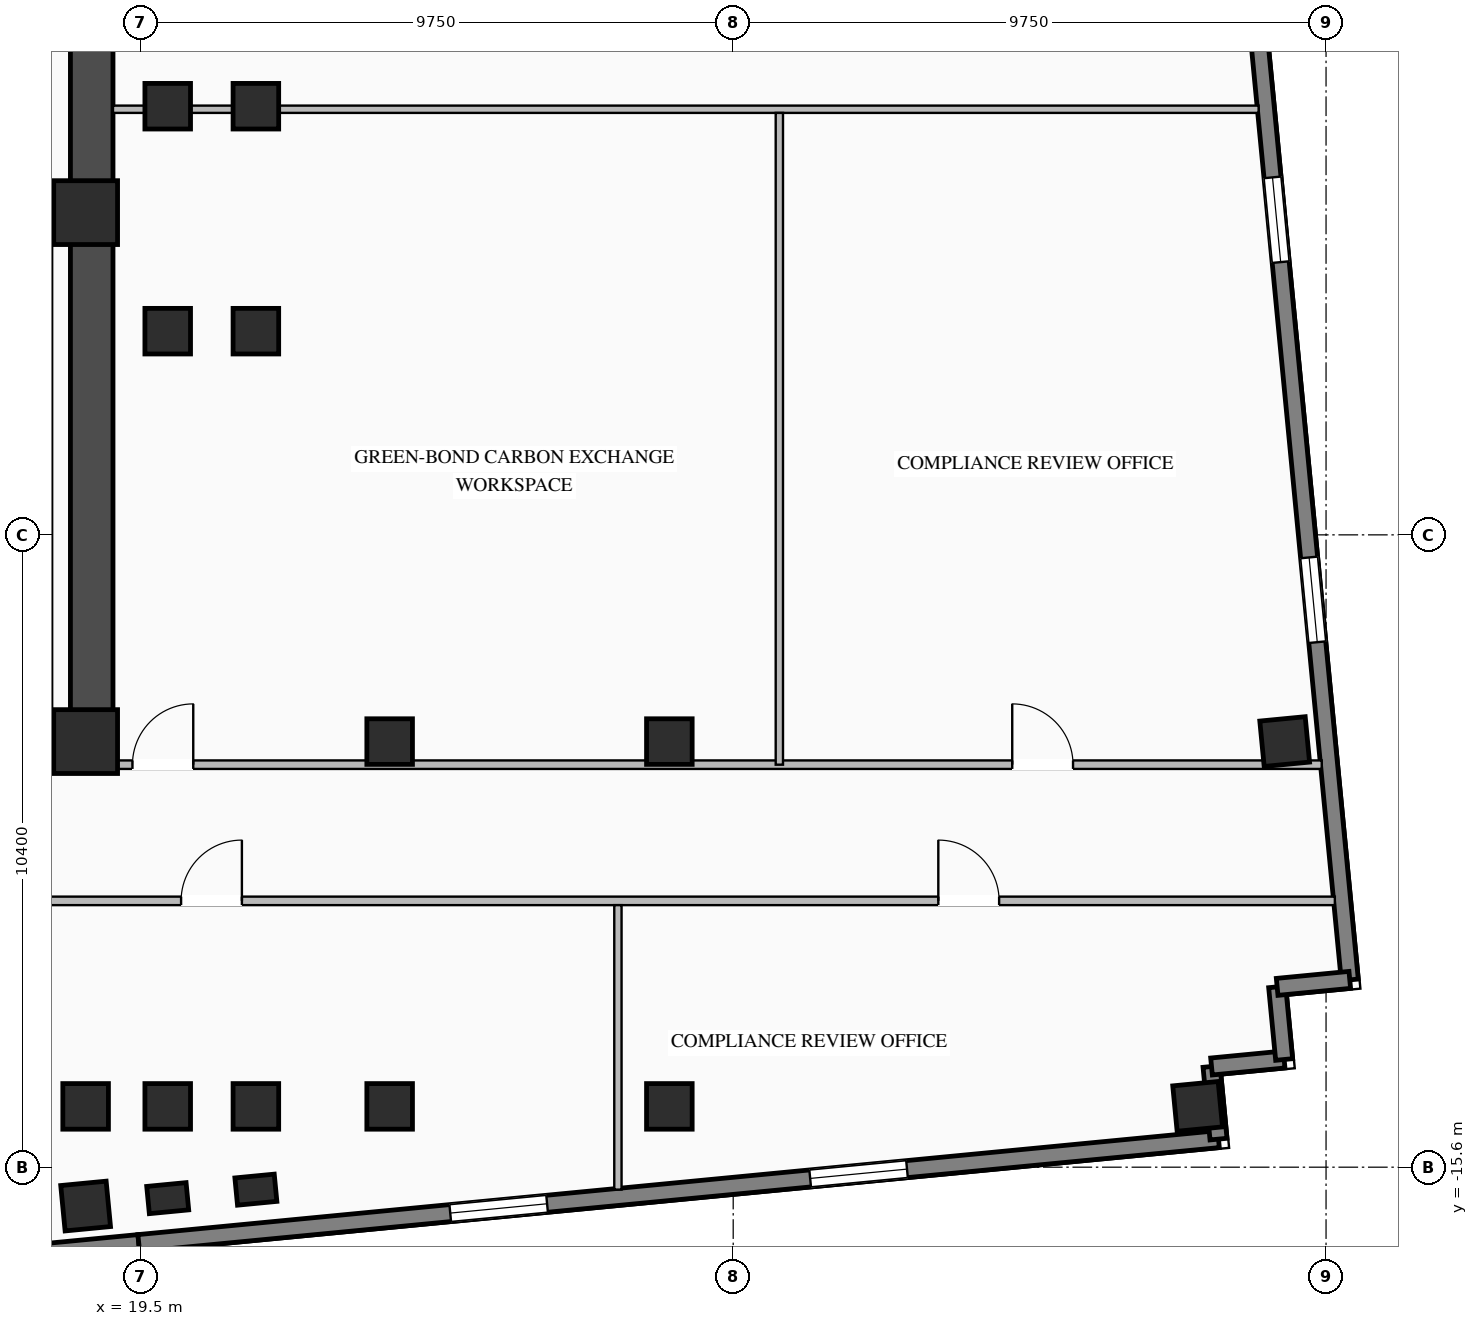
"""IFC4 building model, lengths in metres.
Left out: names, types, materials, properties, quantities, classifications, styles, units other than length and angle.
Written with IfcOpenShell. Run it as: python <this file> out.ifc"""

import sys

from ifc_helpers import new_model, si_unit, direction, frame, frame_2d, origin, origin_2d, place, context, subcontext, project, spatial, rectangle, i_section, extrude, element, fill, save


model = new_model("IFC4")
c1 = context("Model", 3, precision=1e-05, world=origin(), true_north=direction((0.0, 1.0)))
c2 = subcontext(c1, "Body", "Model", "MODEL_VIEW")
j1 = project(units=[si_unit("LENGTHUNIT", "METRE"), si_unit("PLANEANGLEUNIT", "RADIAN")], contexts=[c1])
p1 = place(None, origin())
s1 = spatial("IfcSite", under=j1, at=p1, CompositionType="ELEMENT")
p2 = place(p1, origin())
s2 = spatial("IfcBuilding", under=s1, at=p2, CompositionType="ELEMENT")
p3 = place(p2, frame((0.0, 0.0, 94.9)))
s3 = spatial("IfcBuildingStorey", under=s2, at=p3, CompositionType="ELEMENT", Elevation=94.9)
p4 = place(p3, frame((8.8, -8.7, 0.0), z_axis=(0.0, 0.0, 1.0), x_axis=(1.0, 0.0, 0.0)))
e1 = element("IfcWall", 1, at=p4, inside=s3, PredefinedType="SHEAR", context=c2, shape_type="SweptSolid", body=[
    extrude(rectangle(XDim=10.25, YDim=0.7, at=frame_2d((5.125, 0.0))), origin(), (0.0, 0.0, 1.0), 3.27),
])
p5 = place(p3, frame((18.7, -8.35, 0.0), z_axis=(0.0, 0.0, 1.0), x_axis=(0.0, 1.0, 0.0)))
e2 = element("IfcWall", 2, at=p5, inside=s3, PredefinedType="SHEAR", context=c2, shape_type="SweptSolid", body=[
    extrude(rectangle(XDim=16.7, YDim=0.7, at=frame_2d((8.35, 0.0))), origin(), (0.0, 0.0, 1.0), 3.27),
])
for number, where, z_axis, x_axis in (
    (3, (18.6, -8.6, 0.0), (0.0, 0.0, 1.0), (1.0, 0.0, 0.0)),
    (4, (18.6, 0.1, 0.0), (0.0, 0.0, 1.0), (1.0, 0.0, 0.0)),
):
    element("IfcColumn", number, at=place(p3, frame(where, z_axis=z_axis, x_axis=x_axis)), inside=s3, PredefinedType="COLUMN", context=c2, shape_type="SweptSolid", body=[
        extrude(rectangle(XDim=1.05, YDim=1.05, at=origin_2d()), origin(), (0.0, 0.0, 1.0), 3.45),
    ])
for number, where, z_axis, x_axis in (
    (5, (18.6, -14.6, 0.0), (0.0, 0.0, 1.0), (1.0, 0.0, 0.0)),
    (6, (19.95, -14.6, 0.0), (0.0, 0.0, 1.0), (1.0, 0.0, 0.0)),
    (7, (21.4, -14.6, 0.0), (0.0, 0.0, 1.0), (1.0, 0.0, 0.0)),
    (8, (19.95, -1.85, 0.0), (0.0, 0.0, 1.0), (1.0, 0.0, 0.0)),
    (9, (19.95, 1.85, 0.0), (0.0, 0.0, 1.0), (1.0, 0.0, 0.0)),
    (10, (21.4, -1.85, 0.0), (0.0, 0.0, 1.0), (1.0, 0.0, 0.0)),
    (11, (21.4, 1.85, 0.0), (0.0, 0.0, 1.0), (1.0, 0.0, 0.0)),
    (12, (23.6, -14.6, 0.0), (0.0, 0.0, 1.0), (1.0, 0.0, 0.0)),
    (13, (23.6, -8.6, 0.0), (0.0, 0.0, 1.0), (1.0, 0.0, 0.0)),
    (14, (28.2, -14.6, 0.0), (0.0, 0.0, 1.0), (1.0, 0.0, 0.0)),
    (15, (28.2, -8.6, 0.0), (0.0, 0.0, 1.0), (1.0, 0.0, 0.0)),
    (16, (18.6, -16.239, 0.0), (0.0, 0.0, 1.0), (0.995, 0.096, 0.0)),
    (17, (36.888, -14.6, 0.0), (0.0, 0.0, 1.0), (0.995, 0.096, 0.0)),
    (18, (38.32, -8.6, 0.0), (0.0, 0.0, 1.0), (0.995, 0.096, 0.0)),
):
    element("IfcColumn", number, at=place(p3, frame(where, z_axis=z_axis, x_axis=x_axis)), inside=s3, PredefinedType="COLUMN", context=c2, shape_type="SweptSolid", body=[
        extrude(i_section(OverallWidth=0.75, OverallDepth=0.75, WebThickness=0.03, FlangeThickness=0.044, at=origin_2d()), origin(), (0.0, 0.0, 1.0), 3.45),
    ])
for number, where, z_axis, x_axis in (
    (19, (19.95, -16.109, 0.0), (0.0, 0.0, 1.0), (0.995, 0.096, 0.0)),
    (20, (21.4, -15.969, 0.0), (0.0, 0.0, 1.0), (0.995, 0.096, 0.0)),
):
    element("IfcColumn", number, at=place(p3, frame(where, z_axis=z_axis, x_axis=x_axis)), inside=s3, PredefinedType="PILASTER", context=c2, shape_type="SweptSolid", body=[
        extrude(rectangle(XDim=0.65, YDim=0.45, at=origin_2d()), origin(), (0.0, 0.0, 1.0), 3.45),
    ])
p6 = place(p3, frame((19.474, -16.848, 0.0), z_axis=(0.0, 0.0, 1.0), x_axis=(-0.995396794462, -0.09583956164, 0.0)))
e21 = element("IfcWall", 21, at=p6, inside=s3, PredefinedType="STANDARD", context=c2, shape_type="SweptSolid", body=[
    extrude(rectangle(XDim=9.0, YDim=0.28, at=frame_2d((4.5, 0.0))), origin(), (0.0, 0.0, 1.0), 3.25),
])
p7 = place(p6, frame((2.2, 0.0, 0.76)))
e22 = element("IfcOpeningElement", 22, at=p7, cuts=e21, PredefinedType="OPENING", context=c2, shape_type="SweptSolid", body=[
    extrude(rectangle(XDim=1.6, YDim=1.95, at=frame_2d((0.8, 0.975))), frame((0.0, 0.15, 0.0), z_axis=(0.0, -1.0, 0.0), x_axis=(1.0, 0.0, 0.0)), (0.0, 0.0, 1.0), 0.3),
])
p8 = place(p6, frame((5.75, 0.0, 0.76)))
e23 = element("IfcOpeningElement", 23, at=p8, cuts=e21, PredefinedType="OPENING", context=c2, shape_type="SweptSolid", body=[
    extrude(rectangle(XDim=1.6, YDim=1.95, at=frame_2d((0.8, 0.975))), frame((0.0, 0.15, 0.0), z_axis=(0.0, -1.0, 0.0), x_axis=(1.0, 0.0, 0.0)), (0.0, 0.0, 1.0), 0.3),
])
p9 = place(p3, frame((37.231, -15.138, 0.0), z_axis=(0.0, 0.0, 1.0), x_axis=(-0.995395780835, -0.095850088663, 0.0)))
e24 = element("IfcWall", 24, at=p9, inside=s3, PredefinedType="STANDARD", context=c2, shape_type="SweptSolid", body=[
    extrude(rectangle(XDim=17.84, YDim=0.28, at=frame_2d((8.92, 0.0))), origin(), (0.0, 0.0, 1.0), 3.25),
])
p10 = place(p9, frame((5.147, 0.0, 0.76)))
e25 = element("IfcOpeningElement", 25, at=p10, cuts=e24, PredefinedType="OPENING", context=c2, shape_type="SweptSolid", body=[
    extrude(rectangle(XDim=1.6, YDim=1.95, at=frame_2d((0.8, 0.975))), frame((0.0, 0.15, 0.0), z_axis=(0.0, -1.0, 0.0), x_axis=(1.0, 0.0, 0.0)), (0.0, 0.0, 1.0), 0.3),
])
p11 = place(p9, frame((11.093, 0.0, 0.76)))
e26 = element("IfcOpeningElement", 26, at=p11, cuts=e24, PredefinedType="OPENING", context=c2, shape_type="SweptSolid", body=[
    extrude(rectangle(XDim=1.6, YDim=1.95, at=frame_2d((0.8, 0.975))), frame((0.0, 0.15, 0.0), z_axis=(0.0, -1.0, 0.0), x_axis=(1.0, 0.0, 0.0)), (0.0, 0.0, 1.0), 0.3),
])
p12 = place(p3, frame((37.585, 6.234, 0.0), z_axis=(0.0, 0.0, 1.0), x_axis=(0.095841297881, -0.99539662729, 0.0)))
e27 = element("IfcWall", 27, at=p12, inside=s3, PredefinedType="STANDARD", context=c2, shape_type="SweptSolid", body=[
    extrude(rectangle(XDim=18.84, YDim=0.28, at=frame_2d((9.42, 0.0))), origin(), (0.0, 0.0, 1.0), 3.25),
])
p13 = place(p12, frame((5.58, 0.0, 0.76)))
e28 = element("IfcOpeningElement", 28, at=p13, cuts=e27, PredefinedType="OPENING", context=c2, shape_type="SweptSolid", body=[
    extrude(rectangle(XDim=1.4, YDim=1.95, at=frame_2d((0.7, 0.975))), frame((0.0, 0.15, 0.0), z_axis=(0.0, -1.0, 0.0), x_axis=(1.0, 0.0, 0.0)), (0.0, 0.0, 1.0), 0.3),
])
p14 = place(p12, frame((11.86, 0.0, 0.76)))
e29 = element("IfcOpeningElement", 29, at=p14, cuts=e27, PredefinedType="OPENING", context=c2, shape_type="SweptSolid", body=[
    extrude(rectangle(XDim=1.4, YDim=1.95, at=frame_2d((0.7, 0.975))), frame((0.0, 0.15, 0.0), z_axis=(0.0, -1.0, 0.0), x_axis=(1.0, 0.0, 0.0)), (0.0, 0.0, 1.0), 0.3),
])
for number, where, z_axis, x_axis in (
    (30, (37.231, -15.138, 0.0), (0.0, 0.0, 1.0), (-0.096, 0.995, 0.0)),
    (31, (37.116, -13.944, 0.0), (0.0, 0.0, 1.0), (0.995, 0.096, 0.0)),
):
    element("IfcWall", number, at=place(p3, frame(where, z_axis=z_axis, x_axis=x_axis)), inside=s3, PredefinedType="STANDARD", context=c2, shape_type="SweptSolid", body=[
        extrude(rectangle(XDim=1.2, YDim=0.28, at=frame_2d((0.6, 0.0))), origin(), (0.0, 0.0, 1.0), 2.495),
    ])
for number, where, z_axis, x_axis in (
    (32, (38.311, -13.829, 0.0), (0.0, 0.0, 1.0), (-0.096, 0.995, 0.0)),
    (33, (38.196, -12.635, 0.0), (0.0, 0.0, 1.0), (0.995, 0.096, 0.0)),
):
    element("IfcWall", number, at=place(p3, frame(where, z_axis=z_axis, x_axis=x_axis)), inside=s3, PredefinedType="STANDARD", context=c2, shape_type="SweptSolid", body=[
        extrude(rectangle(XDim=1.2, YDim=0.28, at=frame_2d((0.6, 0.0))), origin(), (0.0, 0.0, 1.0), 2.495),
    ])
p15 = place(p3, frame((-28.406, -11.22, 0.0), z_axis=(0.0, 0.0, 1.0), x_axis=(1.0, 0.0, 0.0)))
e34 = element("IfcWall", 34, at=p15, inside=s3, PredefinedType="STANDARD", context=c2, shape_type="SweptSolid", body=[
    extrude(rectangle(XDim=67.551, YDim=0.14, at=frame_2d((33.775, 0.0))), origin(), (0.0, 0.0, 1.0), 2.745),
])
p16 = place(p15, frame((21.496, 0.0, 0.0)))
e35 = element("IfcOpeningElement", 35, at=p16, cuts=e34, PredefinedType="OPENING", context=c2, shape_type="SweptSolid", body=[
    extrude(rectangle(XDim=0.92, YDim=2.08, at=frame_2d((0.46, 1.04))), frame((0.0, 0.08, 0.0), z_axis=(0.0, -1.0, 0.0), x_axis=(1.0, 0.0, 0.0)), (0.0, 0.0, 1.0), 0.16),
])
p17 = place(p15, frame((24.996, 0.0, 0.0)))
e36 = element("IfcOpeningElement", 36, at=p17, cuts=e34, PredefinedType="OPENING", context=c2, shape_type="SweptSolid", body=[
    extrude(rectangle(XDim=0.92, YDim=2.08, at=frame_2d((0.46, 1.04))), frame((0.0, 0.08, 0.0), z_axis=(0.0, -1.0, 0.0), x_axis=(1.0, 0.0, 0.0)), (0.0, 0.0, 1.0), 0.16),
])
p18 = place(p15, frame((27.846, 0.0, 0.0)))
e37 = element("IfcOpeningElement", 37, at=p18, cuts=e34, PredefinedType="OPENING", context=c2, shape_type="SweptSolid", body=[
    extrude(rectangle(XDim=0.92, YDim=2.08, at=frame_2d((0.46, 1.04))), frame((0.0, 0.08, 0.0), z_axis=(0.0, -1.0, 0.0), x_axis=(1.0, 0.0, 0.0)), (0.0, 0.0, 1.0), 0.16),
])
p19 = place(p15, frame((3.083, 0.0, 0.0)))
e38 = element("IfcOpeningElement", 38, at=p19, cuts=e34, PredefinedType="OPENING", context=c2, shape_type="SweptSolid", body=[
    extrude(rectangle(XDim=1.0, YDim=2.08, at=frame_2d((0.5, 1.04))), frame((0.0, 0.08, 0.0), z_axis=(0.0, -1.0, 0.0), x_axis=(1.0, 0.0, 0.0)), (0.0, 0.0, 1.0), 0.16),
])
p20 = place(p15, frame((9.939, 0.0, 0.0)))
e39 = element("IfcOpeningElement", 39, at=p20, cuts=e34, PredefinedType="OPENING", context=c2, shape_type="SweptSolid", body=[
    extrude(rectangle(XDim=1.0, YDim=2.08, at=frame_2d((0.5, 1.04))), frame((0.0, 0.08, 0.0), z_axis=(0.0, -1.0, 0.0), x_axis=(1.0, 0.0, 0.0)), (0.0, 0.0, 1.0), 0.16),
])
p21 = place(p15, frame((16.585, 0.0, 0.0)))
e40 = element("IfcOpeningElement", 40, at=p21, cuts=e34, PredefinedType="OPENING", context=c2, shape_type="SweptSolid", body=[
    extrude(rectangle(XDim=1.0, YDim=2.08, at=frame_2d((0.5, 1.04))), frame((0.0, 0.08, 0.0), z_axis=(0.0, -1.0, 0.0), x_axis=(1.0, 0.0, 0.0)), (0.0, 0.0, 1.0), 0.16),
])
p22 = place(p15, frame((35.399, 0.0, 0.0)))
e41 = element("IfcOpeningElement", 41, at=p22, cuts=e34, PredefinedType="OPENING", context=c2, shape_type="SweptSolid", body=[
    extrude(rectangle(XDim=1.0, YDim=2.08, at=frame_2d((0.5, 1.04))), frame((0.0, 0.08, 0.0), z_axis=(0.0, -1.0, 0.0), x_axis=(1.0, 0.0, 0.0)), (0.0, 0.0, 1.0), 0.16),
])
p23 = place(p15, frame((48.576, 0.0, 0.0)))
e42 = element("IfcOpeningElement", 42, at=p23, cuts=e34, PredefinedType="OPENING", context=c2, shape_type="SweptSolid", body=[
    extrude(rectangle(XDim=1.0, YDim=2.08, at=frame_2d((0.5, 1.04))), frame((0.0, 0.08, 0.0), z_axis=(0.0, -1.0, 0.0), x_axis=(1.0, 0.0, 0.0)), (0.0, 0.0, 1.0), 0.16),
])
p24 = place(p15, frame((61.03, 0.0, 0.0)))
e43 = element("IfcOpeningElement", 43, at=p24, cuts=e34, PredefinedType="OPENING", context=c2, shape_type="SweptSolid", body=[
    extrude(rectangle(XDim=1.0, YDim=2.08, at=frame_2d((0.5, 1.04))), frame((0.0, 0.08, 0.0), z_axis=(0.0, -1.0, 0.0), x_axis=(1.0, 0.0, 0.0)), (0.0, 0.0, 1.0), 0.16),
])
p25 = place(p3, frame((27.354, -15.969, 0.0), z_axis=(0.0, 0.0, 1.0), x_axis=(0.0, 1.0, 0.0)))
e44 = element("IfcWall", 44, at=p25, inside=s3, PredefinedType="STANDARD", context=c2, shape_type="SweptSolid", body=[
    extrude(rectangle(XDim=4.679, YDim=0.12, at=frame_2d((2.339, 0.0))), origin(), (0.0, 0.0, 1.0), 3.25),
])
p26 = place(p3, frame((19.05, -8.98, 0.0), z_axis=(0.0, 0.0, 1.0), x_axis=(1.0, 0.0, 0.0)))
e45 = element("IfcWall", 45, at=p26, inside=s3, PredefinedType="STANDARD", context=c2, shape_type="SweptSolid", body=[
    extrude(rectangle(XDim=19.879, YDim=0.14, at=frame_2d((9.939, 0.0))), origin(), (0.0, 0.0, 1.0), 3.25),
])
p27 = place(p26, frame((0.32, 0.0, 0.0)))
e46 = element("IfcOpeningElement", 46, at=p27, cuts=e45, PredefinedType="OPENING", context=c2, shape_type="SweptSolid", body=[
    extrude(rectangle(XDim=1.0, YDim=2.08, at=frame_2d((0.5, 1.04))), frame((0.0, 0.08, 0.0), z_axis=(0.0, -1.0, 0.0), x_axis=(1.0, 0.0, 0.0)), (0.0, 0.0, 1.0), 0.16),
])
p28 = place(p26, frame((14.789, 0.0, 0.0)))
e47 = element("IfcOpeningElement", 47, at=p28, cuts=e45, PredefinedType="OPENING", context=c2, shape_type="SweptSolid", body=[
    extrude(rectangle(XDim=1.0, YDim=2.08, at=frame_2d((0.5, 1.04))), frame((0.0, 0.08, 0.0), z_axis=(0.0, -1.0, 0.0), x_axis=(1.0, 0.0, 0.0)), (0.0, 0.0, 1.0), 0.16),
])
p29 = place(p3, frame((19.05, 1.8, 0.0), z_axis=(0.0, 0.0, 1.0), x_axis=(1.0, 0.0, 0.0)))
e48 = element("IfcWall", 48, at=p29, inside=s3, PredefinedType="STANDARD", context=c2, shape_type="SweptSolid", body=[
    extrude(rectangle(XDim=18.841, YDim=0.12, at=frame_2d((9.42, 0.0))), origin(), (0.0, 0.0, 1.0), 3.25),
])
p30 = place(p3, frame((30.009, -8.98, 0.0), z_axis=(0.0, 0.0, 1.0), x_axis=(0.0, 1.0, 0.0)))
e49 = element("IfcWall", 49, at=p30, inside=s3, PredefinedType="STANDARD", context=c2, shape_type="SweptSolid", body=[
    extrude(rectangle(XDim=10.72, YDim=0.12, at=frame_2d((5.36, 0.0))), origin(), (0.0, 0.0, 1.0), 3.25),
])
p31 = place(p10, origin())
e50 = element("IfcWindow", 50, at=p31, inside=s3, PartitioningType="SINGLE_PANEL", PredefinedType="WINDOW", context=c2, shape_type="SweptSolid", body=[
    extrude(rectangle(XDim=1.6, YDim=1.95, at=frame_2d((0.8, 0.975))), frame((0.0, 0.03, 0.0), z_axis=(0.0, -1.0, 0.0), x_axis=(1.0, 0.0, 0.0)), (0.0, 0.0, 1.0), 0.06),
])
fill(e25, e50)
p32 = place(p11, origin())
e51 = element("IfcWindow", 51, at=p32, inside=s3, PartitioningType="SINGLE_PANEL", PredefinedType="WINDOW", context=c2, shape_type="SweptSolid", body=[
    extrude(rectangle(XDim=1.6, YDim=1.95, at=frame_2d((0.8, 0.975))), frame((0.0, 0.03, 0.0), z_axis=(0.0, -1.0, 0.0), x_axis=(1.0, 0.0, 0.0)), (0.0, 0.0, 1.0), 0.06),
])
fill(e26, e51)
p33 = place(p13, origin())
e52 = element("IfcWindow", 52, at=p33, inside=s3, PartitioningType="SINGLE_PANEL", PredefinedType="WINDOW", context=c2, shape_type="SweptSolid", body=[
    extrude(rectangle(XDim=1.4, YDim=1.95, at=frame_2d((0.7, 0.975))), frame((0.0, 0.03, 0.0), z_axis=(0.0, -1.0, 0.0), x_axis=(1.0, 0.0, 0.0)), (0.0, 0.0, 1.0), 0.06),
])
fill(e28, e52)
p34 = place(p14, origin())
e53 = element("IfcWindow", 53, at=p34, inside=s3, PartitioningType="SINGLE_PANEL", PredefinedType="WINDOW", context=c2, shape_type="SweptSolid", body=[
    extrude(rectangle(XDim=1.4, YDim=1.95, at=frame_2d((0.7, 0.975))), frame((0.0, 0.03, 0.0), z_axis=(0.0, -1.0, 0.0), x_axis=(1.0, 0.0, 0.0)), (0.0, 0.0, 1.0), 0.06),
])
fill(e29, e53)
p35 = place(p23, origin())
e54 = element("IfcDoor", 54, at=p35, inside=s3, OperationType="SINGLE_SWING_RIGHT", PredefinedType="DOOR", context=c2, shape_type="SweptSolid", body=[
    extrude(rectangle(XDim=1.0, YDim=2.08, at=frame_2d((0.5, 1.04))), frame((0.0, 0.025, 0.0), z_axis=(0.0, -1.0, 0.0), x_axis=(1.0, 0.0, 0.0)), (0.0, 0.0, 1.0), 0.05),
])
fill(e42, e54)
p36 = place(p24, origin())
e55 = element("IfcDoor", 55, at=p36, inside=s3, OperationType="SINGLE_SWING_LEFT", PredefinedType="DOOR", context=c2, shape_type="SweptSolid", body=[
    extrude(rectangle(XDim=1.0, YDim=2.08, at=frame_2d((0.5, 1.04))), frame((0.0, 0.025, 0.0), z_axis=(0.0, -1.0, 0.0), x_axis=(1.0, 0.0, 0.0)), (0.0, 0.0, 1.0), 0.05),
])
fill(e43, e55)
p37 = place(p27, origin())
e56 = element("IfcDoor", 56, at=p37, inside=s3, OperationType="SINGLE_SWING_RIGHT", PredefinedType="DOOR", context=c2, shape_type="SweptSolid", body=[
    extrude(rectangle(XDim=1.0, YDim=2.08, at=frame_2d((0.5, 1.04))), frame((0.0, 0.025, 0.0), z_axis=(0.0, -1.0, 0.0), x_axis=(1.0, 0.0, 0.0)), (0.0, 0.0, 1.0), 0.05),
])
fill(e46, e56)
p38 = place(p28, origin())
e57 = element("IfcDoor", 57, at=p38, inside=s3, OperationType="SINGLE_SWING_LEFT", PredefinedType="DOOR", context=c2, shape_type="SweptSolid", body=[
    extrude(rectangle(XDim=1.0, YDim=2.08, at=frame_2d((0.5, 1.04))), frame((0.0, 0.025, 0.0), z_axis=(0.0, -1.0, 0.0), x_axis=(1.0, 0.0, 0.0)), (0.0, 0.0, 1.0), 0.05),
])
fill(e47, e57)
save(model, sys.argv[1])
